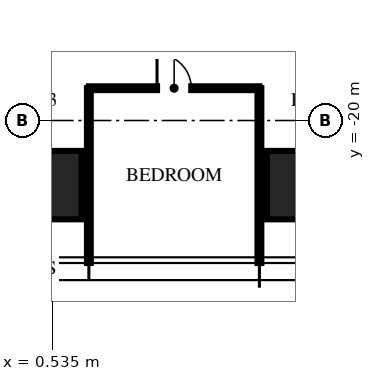
"""IFC4 building model, lengths in metres.
Left out: names, types, materials, properties, quantities, classifications, styles, units other than length and angle.
Written with IfcOpenShell. Run it as: python <this file> out.ifc"""

import sys

from ifc_helpers import new_model, si_unit, direction, frame, frame_2d, origin, origin_2d, place, context, subcontext, project, spatial, rectangle, extrude, element, fill, save


model = new_model("IFC4")
c1 = context("Model", 3, precision=1e-05, world=origin(), true_north=direction((0.0, 1.0)))
c2 = subcontext(c1, "Body", "Model", "MODEL_VIEW")
j1 = project(units=[si_unit("LENGTHUNIT", "METRE"), si_unit("PLANEANGLEUNIT", "RADIAN")], contexts=[c1])
p1 = place(None, origin())
s1 = spatial("IfcSite", under=j1, at=p1, CompositionType="ELEMENT")
p2 = place(p1, origin())
s2 = spatial("IfcBuilding", under=s1, at=p2, CompositionType="ELEMENT")
p3 = place(p2, frame((0.0, 0.0, 297.0)))
s3 = spatial("IfcBuildingStorey", under=s2, at=p3, CompositionType="ELEMENT", Elevation=297.0)
for number, where, z_axis, x_axis in (
    (1, (7.48, -21.7, 0.0), (0.0, 0.0, 1.0), (1.0, 0.0, 0.0)),
    (2, (0.0, -21.7, 0.0), (0.0, 0.0, 1.0), (1.0, 0.0, 0.0)),
):
    element("IfcColumn", number, at=place(p3, frame(where, z_axis=z_axis, x_axis=x_axis)), inside=s3, PredefinedType="COLUMN", context=c2, shape_type="SweptSolid", body=[
        extrude(rectangle(XDim=2.6, YDim=1.8, at=origin_2d()), origin(), (0.0, 0.0, 1.0), 3.75),
    ])
for number, where, z_axis, x_axis in (
    (3, (1.496, -19.15, 0.0), (0.0, 0.0, 1.0), (0.0, -1.0, 0.0)),
    (4, (5.984, -19.15, 0.0), (0.0, 0.0, 1.0), (0.0, -1.0, 0.0)),
):
    element("IfcWall", number, at=place(p3, frame(where, z_axis=z_axis, x_axis=x_axis)), inside=s3, PredefinedType="PARTITIONING", context=c2, shape_type="SweptSolid", body=[
        extrude(rectangle(XDim=4.6, YDim=0.1, at=frame_2d((2.3, 0.0))), origin(), (0.0, 0.0, 1.0), 3.01),
    ])
p4 = place(p3, frame((1.496, -19.15, 0.0), z_axis=(0.0, 0.0, 1.0), x_axis=(1.0, 0.0, 0.0)))
e5 = element("IfcWall", 5, at=p4, inside=s3, PredefinedType="PARTITIONING", context=c2, shape_type="SweptSolid", body=[
    extrude(rectangle(XDim=4.488, YDim=0.1, at=frame_2d((2.244, 0.0))), origin(), (0.0, 0.0, 1.0), 2.91),
])
p5 = place(p4, frame((1.794, 0.0, 0.0)))
e6 = element("IfcOpeningElement", 6, at=p5, cuts=e5, PredefinedType="OPENING", context=c2, shape_type="SweptSolid", body=[
    extrude(rectangle(XDim=0.9, YDim=2.1, at=frame_2d((0.45, 1.05))), frame((0.0, 0.06, 0.0), z_axis=(0.0, -1.0, 0.0), x_axis=(1.0, 0.0, 0.0)), (0.0, 0.0, 1.0), 0.12),
])
p6 = place(p5, origin())
e7 = element("IfcDoor", 7, at=p6, inside=s3, OperationType="SINGLE_SWING_LEFT", PredefinedType="DOOR", context=c2, shape_type="SweptSolid", body=[
    extrude(rectangle(XDim=0.9, YDim=2.1, at=frame_2d((0.45, 1.05))), frame((0.0, 0.025, 0.0), z_axis=(0.0, -1.0, 0.0), x_axis=(1.0, 0.0, 0.0)), (0.0, 0.0, 1.0), 0.05),
])
fill(e6, e7)
save(model, sys.argv[1])
